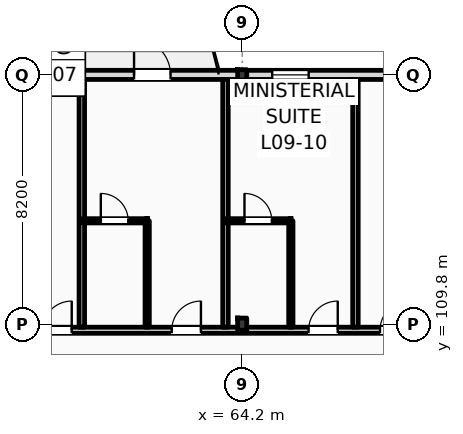
"""IFC4 building model, lengths in metres.
Left out: names, types, materials, properties, quantities, classifications, styles, units other than length and angle.
Written with IfcOpenShell. Run it as: python <this file> out.ifc"""

import sys

from ifc_helpers import new_model, si_unit, direction, frame, frame_2d, origin, origin_2d, place, context, subcontext, project, spatial, rectangle, i_section, extrude, element, fill, save


model = new_model("IFC4")
c1 = context("Model", 3, precision=1e-05, world=origin(), true_north=direction((0.0, 1.0)))
c2 = subcontext(c1, "Body", "Model", "MODEL_VIEW")
j1 = project(units=[si_unit("LENGTHUNIT", "METRE"), si_unit("PLANEANGLEUNIT", "RADIAN")], contexts=[c1])
p1 = place(None, origin())
s1 = spatial("IfcSite", under=j1, at=p1, CompositionType="ELEMENT")
p2 = place(p1, origin())
s2 = spatial("IfcBuilding", under=s1, at=p2, CompositionType="ELEMENT")
p3 = place(p2, frame((0.0, 0.0, 39.0)))
s3 = spatial("IfcBuildingStorey", under=s2, at=p3, CompositionType="ELEMENT", Elevation=39.0)
p4 = place(p3, frame((64.2, 109.8, 0.0), z_axis=(0.0, 0.0, 1.0), x_axis=(1.0, 0.0, 0.0)))
e1 = element("IfcColumn", 1, at=p4, inside=s3, PredefinedType="COLUMN", context=c2, shape_type="SweptSolid", body=[
    extrude(i_section(OverallWidth=0.3, OverallDepth=0.4, WebThickness=0.013, FlangeThickness=0.024, FilletRadius=0.027, at=origin_2d()), origin(), (0.0, 0.0, 1.0), 3.6),
])
p5 = place(p3, frame((64.2, 118.0, 0.0), z_axis=(0.0, 0.0, 1.0), x_axis=(1.0, 0.0, 0.0)))
e2 = element("IfcColumn", 2, at=p5, inside=s3, PredefinedType="COLUMN", context=c2, shape_type="SweptSolid", body=[
    extrude(i_section(OverallWidth=0.3, OverallDepth=0.34, WebThickness=0.012, FlangeThickness=0.021, FilletRadius=0.027, at=origin_2d()), origin(), (0.0, 0.0, 1.0), 3.6),
])
p6 = place(p3, frame((22.5, 118.0, 0.0), z_axis=(0.0, 0.0, 1.0), x_axis=(1.0, 0.0, 0.0)))
e3 = element("IfcWall", 3, at=p6, inside=s3, PredefinedType="STANDARD", context=c2, shape_type="SweptSolid", body=[
    extrude(rectangle(XDim=72.9, YDim=0.3, at=frame_2d((36.45, 0.0))), origin(), (0.0, 0.0, 1.0), 2.92),
])
p7 = place(p6, frame((3.6, 0.0, 0.9)))
e4 = element("IfcOpeningElement", 4, at=p7, cuts=e3, PredefinedType="OPENING", context=c2, shape_type="SweptSolid", body=[
    extrude(rectangle(XDim=1.1, YDim=1.6, at=frame_2d((0.55, 0.8))), frame((0.0, 0.16, 0.0), z_axis=(0.0, -1.0, 0.0), x_axis=(1.0, 0.0, 0.0)), (0.0, 0.0, 1.0), 0.32),
])
p8 = place(p6, frame((6.688, 0.0, 0.0)))
e5 = element("IfcOpeningElement", 5, at=p8, cuts=e3, PredefinedType="OPENING", context=c2, shape_type="SweptSolid", body=[
    extrude(rectangle(XDim=1.2, YDim=2.25, at=frame_2d((0.6, 1.125))), frame((0.0, 0.16, 0.0), z_axis=(0.0, -1.0, 0.0), x_axis=(1.0, 0.0, 0.0)), (0.0, 0.0, 1.0), 0.32),
])
p9 = place(p6, frame((11.388, 0.0, 0.9)))
e6 = element("IfcOpeningElement", 6, at=p9, cuts=e3, PredefinedType="OPENING", context=c2, shape_type="SweptSolid", body=[
    extrude(rectangle(XDim=1.6, YDim=1.75, at=frame_2d((0.8, 0.875))), frame((0.0, 0.16, 0.0), z_axis=(0.0, -1.0, 0.0), x_axis=(1.0, 0.0, 0.0)), (0.0, 0.0, 1.0), 0.32),
])
p10 = place(p6, frame((15.413, 0.0, 0.9)))
e7 = element("IfcOpeningElement", 7, at=p10, cuts=e3, PredefinedType="OPENING", context=c2, shape_type="SweptSolid", body=[
    extrude(rectangle(XDim=1.75, YDim=1.84, at=frame_2d((0.875, 0.92))), frame((0.0, 0.16, 0.0), z_axis=(0.0, -1.0, 0.0), x_axis=(1.0, 0.0, 0.0)), (0.0, 0.0, 1.0), 0.32),
])
p11 = place(p6, frame((21.245, 0.0, 0.0)))
e8 = element("IfcOpeningElement", 8, at=p11, cuts=e3, PredefinedType="OPENING", context=c2, shape_type="SweptSolid", body=[
    extrude(rectangle(XDim=1.2, YDim=2.25, at=frame_2d((0.6, 1.125))), frame((0.0, 0.16, 0.0), z_axis=(0.0, -1.0, 0.0), x_axis=(1.0, 0.0, 0.0)), (0.0, 0.0, 1.0), 0.32),
])
p12 = place(p6, frame((23.705, 0.0, 0.0)))
e9 = element("IfcOpeningElement", 9, at=p12, cuts=e3, PredefinedType="OPENING", context=c2, shape_type="SweptSolid", body=[
    extrude(rectangle(XDim=1.2, YDim=2.25, at=frame_2d((0.6, 1.125))), frame((0.0, 0.16, 0.0), z_axis=(0.0, -1.0, 0.0), x_axis=(1.0, 0.0, 0.0)), (0.0, 0.0, 1.0), 0.32),
])
p13 = place(p6, frame((28.488, 0.0, 0.9)))
e10 = element("IfcOpeningElement", 10, at=p13, cuts=e3, PredefinedType="OPENING", context=c2, shape_type="SweptSolid", body=[
    extrude(rectangle(XDim=2.6, YDim=1.84, at=frame_2d((1.3, 0.92))), frame((0.0, 0.16, 0.0), z_axis=(0.0, -1.0, 0.0), x_axis=(1.0, 0.0, 0.0)), (0.0, 0.0, 1.0), 0.32),
])
p14 = place(p6, frame((34.76, 0.0, 0.9)))
e11 = element("IfcOpeningElement", 11, at=p14, cuts=e3, PredefinedType="OPENING", context=c2, shape_type="SweptSolid", body=[
    extrude(rectangle(XDim=1.1, YDim=1.84, at=frame_2d((0.55, 0.92))), frame((0.0, 0.16, 0.0), z_axis=(0.0, -1.0, 0.0), x_axis=(1.0, 0.0, 0.0)), (0.0, 0.0, 1.0), 0.32),
])
p15 = place(p6, frame((38.143, 0.0, 0.0)))
e12 = element("IfcOpeningElement", 12, at=p15, cuts=e3, PredefinedType="OPENING", context=c2, shape_type="SweptSolid", body=[
    extrude(rectangle(XDim=1.2, YDim=2.25, at=frame_2d((0.6, 1.125))), frame((0.0, 0.16, 0.0), z_axis=(0.0, -1.0, 0.0), x_axis=(1.0, 0.0, 0.0)), (0.0, 0.0, 1.0), 0.32),
])
p16 = place(p6, frame((42.687, 0.0, 0.9)))
e13 = element("IfcOpeningElement", 13, at=p16, cuts=e3, PredefinedType="OPENING", context=c2, shape_type="SweptSolid", body=[
    extrude(rectangle(XDim=1.2, YDim=1.8, at=frame_2d((0.6, 0.9))), frame((0.0, 0.16, 0.0), z_axis=(0.0, -1.0, 0.0), x_axis=(1.0, 0.0, 0.0)), (0.0, 0.0, 1.0), 0.32),
])
p17 = place(p6, frame((47.112, 0.0, 0.9)))
e14 = element("IfcOpeningElement", 14, at=p17, cuts=e3, PredefinedType="OPENING", context=c2, shape_type="SweptSolid", body=[
    extrude(rectangle(XDim=1.35, YDim=1.84, at=frame_2d((0.675, 0.92))), frame((0.0, 0.16, 0.0), z_axis=(0.0, -1.0, 0.0), x_axis=(1.0, 0.0, 0.0)), (0.0, 0.0, 1.0), 0.32),
])
p18 = place(p6, frame((52.482, 0.0, 0.0)))
e15 = element("IfcOpeningElement", 15, at=p18, cuts=e3, PredefinedType="OPENING", context=c2, shape_type="SweptSolid", body=[
    extrude(rectangle(XDim=1.2, YDim=2.25, at=frame_2d((0.6, 1.125))), frame((0.0, 0.16, 0.0), z_axis=(0.0, -1.0, 0.0), x_axis=(1.0, 0.0, 0.0)), (0.0, 0.0, 1.0), 0.32),
])
p19 = place(p6, frame((54.942, 0.0, 0.0)))
e16 = element("IfcOpeningElement", 16, at=p19, cuts=e3, PredefinedType="OPENING", context=c2, shape_type="SweptSolid", body=[
    extrude(rectangle(XDim=1.2, YDim=2.25, at=frame_2d((0.6, 1.125))), frame((0.0, 0.16, 0.0), z_axis=(0.0, -1.0, 0.0), x_axis=(1.0, 0.0, 0.0)), (0.0, 0.0, 1.0), 0.32),
])
p20 = place(p6, frame((60.387, 0.0, 0.9)))
e17 = element("IfcOpeningElement", 17, at=p20, cuts=e3, PredefinedType="OPENING", context=c2, shape_type="SweptSolid", body=[
    extrude(rectangle(XDim=1.8, YDim=1.84, at=frame_2d((0.9, 0.92))), frame((0.0, 0.16, 0.0), z_axis=(0.0, -1.0, 0.0), x_axis=(1.0, 0.0, 0.0)), (0.0, 0.0, 1.0), 0.32),
])
p21 = place(p6, frame((66.013, 0.0, 0.9)))
e18 = element("IfcOpeningElement", 18, at=p21, cuts=e3, PredefinedType="OPENING", context=c2, shape_type="SweptSolid", body=[
    extrude(rectangle(XDim=1.35, YDim=1.84, at=frame_2d((0.675, 0.92))), frame((0.0, 0.16, 0.0), z_axis=(0.0, -1.0, 0.0), x_axis=(1.0, 0.0, 0.0)), (0.0, 0.0, 1.0), 0.32),
])
p22 = place(p6, frame((69.275, 0.0, 0.9)))
e19 = element("IfcOpeningElement", 19, at=p22, cuts=e3, PredefinedType="OPENING", context=c2, shape_type="SweptSolid", body=[
    extrude(rectangle(XDim=2.1, YDim=1.84, at=frame_2d((1.05, 0.92))), frame((0.0, 0.16, 0.0), z_axis=(0.0, -1.0, 0.0), x_axis=(1.0, 0.0, 0.0)), (0.0, 0.0, 1.0), 0.32),
])
p23 = place(p3, frame((10.65, 109.6, 0.0), z_axis=(0.0, 0.0, 1.0), x_axis=(1.0, 0.0, 0.0)))
e20 = element("IfcWall", 20, at=p23, inside=s3, PredefinedType="PARTITIONING", context=c2, shape_type="SweptSolid", body=[
    extrude(rectangle(XDim=84.61, YDim=0.2, at=frame_2d((42.305, 0.0))), origin(), (0.0, 0.0, 1.0), 2.82),
])
p24 = place(p23, frame((15.49, 0.0, 0.0)))
e21 = element("IfcOpeningElement", 21, at=p24, cuts=e20, PredefinedType="OPENING", context=c2, shape_type="SweptSolid", body=[
    extrude(rectangle(XDim=1.02, YDim=2.2, at=frame_2d((0.51, 1.1))), frame((0.0, 0.11, 0.0), z_axis=(0.0, -1.0, 0.0), x_axis=(1.0, 0.0, 0.0)), (0.0, 0.0, 1.0), 0.22),
])
p25 = place(p23, frame((19.703, 0.0, 0.0)))
e22 = element("IfcOpeningElement", 22, at=p25, cuts=e20, PredefinedType="OPENING", context=c2, shape_type="SweptSolid", body=[
    extrude(rectangle(XDim=1.02, YDim=2.2, at=frame_2d((0.51, 1.1))), frame((0.0, 0.11, 0.0), z_axis=(0.0, -1.0, 0.0), x_axis=(1.0, 0.0, 0.0)), (0.0, 0.0, 1.0), 0.22),
])
p26 = place(p23, frame((24.203, 0.0, 0.0)))
e23 = element("IfcOpeningElement", 23, at=p26, cuts=e20, PredefinedType="OPENING", context=c2, shape_type="SweptSolid", body=[
    extrude(rectangle(XDim=1.02, YDim=2.2, at=frame_2d((0.51, 1.1))), frame((0.0, 0.11, 0.0), z_axis=(0.0, -1.0, 0.0), x_axis=(1.0, 0.0, 0.0)), (0.0, 0.0, 1.0), 0.22),
])
p27 = place(p23, frame((26.552, 0.0, 0.0)))
e24 = element("IfcOpeningElement", 24, at=p27, cuts=e20, PredefinedType="OPENING", context=c2, shape_type="SweptSolid", body=[
    extrude(rectangle(XDim=1.02, YDim=2.2, at=frame_2d((0.51, 1.1))), frame((0.0, 0.11, 0.0), z_axis=(0.0, -1.0, 0.0), x_axis=(1.0, 0.0, 0.0)), (0.0, 0.0, 1.0), 0.22),
])
p28 = place(p23, frame((33.233, 0.0, 0.0)))
e25 = element("IfcOpeningElement", 25, at=p28, cuts=e20, PredefinedType="OPENING", context=c2, shape_type="SweptSolid", body=[
    extrude(rectangle(XDim=0.96, YDim=2.2, at=frame_2d((0.48, 1.1))), frame((0.0, 0.11, 0.0), z_axis=(0.0, -1.0, 0.0), x_axis=(1.0, 0.0, 0.0)), (0.0, 0.0, 1.0), 0.22),
])
p29 = place(p23, frame((35.583, 0.0, 0.0)))
e26 = element("IfcOpeningElement", 26, at=p29, cuts=e20, PredefinedType="OPENING", context=c2, shape_type="SweptSolid", body=[
    extrude(rectangle(XDim=0.96, YDim=2.2, at=frame_2d((0.48, 1.1))), frame((0.0, 0.11, 0.0), z_axis=(0.0, -1.0, 0.0), x_axis=(1.0, 0.0, 0.0)), (0.0, 0.0, 1.0), 0.22),
])
p30 = place(p23, frame((42.233, 0.0, 0.0)))
e27 = element("IfcOpeningElement", 27, at=p30, cuts=e20, PredefinedType="OPENING", context=c2, shape_type="SweptSolid", body=[
    extrude(rectangle(XDim=0.96, YDim=2.2, at=frame_2d((0.48, 1.1))), frame((0.0, 0.11, 0.0), z_axis=(0.0, -1.0, 0.0), x_axis=(1.0, 0.0, 0.0)), (0.0, 0.0, 1.0), 0.22),
])
p31 = place(p23, frame((46.983, 0.0, 0.0)))
e28 = element("IfcOpeningElement", 28, at=p31, cuts=e20, PredefinedType="OPENING", context=c2, shape_type="SweptSolid", body=[
    extrude(rectangle(XDim=0.96, YDim=2.2, at=frame_2d((0.48, 1.1))), frame((0.0, 0.11, 0.0), z_axis=(0.0, -1.0, 0.0), x_axis=(1.0, 0.0, 0.0)), (0.0, 0.0, 1.0), 0.22),
])
p32 = place(p23, frame((51.233, 0.0, 0.0)))
e29 = element("IfcOpeningElement", 29, at=p32, cuts=e20, PredefinedType="OPENING", context=c2, shape_type="SweptSolid", body=[
    extrude(rectangle(XDim=0.96, YDim=2.2, at=frame_2d((0.48, 1.1))), frame((0.0, 0.11, 0.0), z_axis=(0.0, -1.0, 0.0), x_axis=(1.0, 0.0, 0.0)), (0.0, 0.0, 1.0), 0.22),
])
p33 = place(p23, frame((55.733, 0.0, 0.0)))
e30 = element("IfcOpeningElement", 30, at=p33, cuts=e20, PredefinedType="OPENING", context=c2, shape_type="SweptSolid", body=[
    extrude(rectangle(XDim=0.96, YDim=2.2, at=frame_2d((0.48, 1.1))), frame((0.0, 0.11, 0.0), z_axis=(0.0, -1.0, 0.0), x_axis=(1.0, 0.0, 0.0)), (0.0, 0.0, 1.0), 0.22),
])
p34 = place(p23, frame((58.083, 0.0, 0.0)))
e31 = element("IfcOpeningElement", 31, at=p34, cuts=e20, PredefinedType="OPENING", context=c2, shape_type="SweptSolid", body=[
    extrude(rectangle(XDim=0.96, YDim=2.2, at=frame_2d((0.48, 1.1))), frame((0.0, 0.11, 0.0), z_axis=(0.0, -1.0, 0.0), x_axis=(1.0, 0.0, 0.0)), (0.0, 0.0, 1.0), 0.22),
])
p35 = place(p23, frame((64.732, 0.0, 0.0)))
e32 = element("IfcOpeningElement", 32, at=p35, cuts=e20, PredefinedType="OPENING", context=c2, shape_type="SweptSolid", body=[
    extrude(rectangle(XDim=0.96, YDim=2.2, at=frame_2d((0.48, 1.1))), frame((0.0, 0.11, 0.0), z_axis=(0.0, -1.0, 0.0), x_axis=(1.0, 0.0, 0.0)), (0.0, 0.0, 1.0), 0.22),
])
p36 = place(p23, frame((66.832, 0.0, 0.0)))
e33 = element("IfcOpeningElement", 33, at=p36, cuts=e20, PredefinedType="OPENING", context=c2, shape_type="SweptSolid", body=[
    extrude(rectangle(XDim=0.96, YDim=2.2, at=frame_2d((0.48, 1.1))), frame((0.0, 0.11, 0.0), z_axis=(0.0, -1.0, 0.0), x_axis=(1.0, 0.0, 0.0)), (0.0, 0.0, 1.0), 0.22),
])
p37 = place(p23, frame((73.732, 0.0, 0.0)))
e34 = element("IfcOpeningElement", 34, at=p37, cuts=e20, PredefinedType="OPENING", context=c2, shape_type="SweptSolid", body=[
    extrude(rectangle(XDim=0.96, YDim=2.2, at=frame_2d((0.48, 1.1))), frame((0.0, 0.11, 0.0), z_axis=(0.0, -1.0, 0.0), x_axis=(1.0, 0.0, 0.0)), (0.0, 0.0, 1.0), 0.22),
])
p38 = place(p23, frame((78.233, 0.0, 0.0)))
e35 = element("IfcOpeningElement", 35, at=p38, cuts=e20, PredefinedType="OPENING", context=c2, shape_type="SweptSolid", body=[
    extrude(rectangle(XDim=0.96, YDim=2.2, at=frame_2d((0.48, 1.1))), frame((0.0, 0.11, 0.0), z_axis=(0.0, -1.0, 0.0), x_axis=(1.0, 0.0, 0.0)), (0.0, 0.0, 1.0), 0.22),
])
p39 = place(p23, frame((80.62, 0.0, 0.0)))
e36 = element("IfcOpeningElement", 36, at=p39, cuts=e20, PredefinedType="OPENING", context=c2, shape_type="SweptSolid", body=[
    extrude(rectangle(XDim=0.96, YDim=2.2, at=frame_2d((0.48, 1.1))), frame((0.0, 0.11, 0.0), z_axis=(0.0, -1.0, 0.0), x_axis=(1.0, 0.0, 0.0)), (0.0, 0.0, 1.0), 0.22),
])
p40 = place(p23, frame((2.716, 0.0, 0.0)))
e37 = element("IfcOpeningElement", 37, at=p40, cuts=e20, PredefinedType="OPENING", context=c2, shape_type="SweptSolid", body=[
    extrude(rectangle(XDim=1.35, YDim=2.25, at=frame_2d((0.675, 1.125))), frame((0.0, 0.11, 0.0), z_axis=(0.0, -1.0, 0.0), x_axis=(1.0, 0.0, 0.0)), (0.0, 0.0, 1.0), 0.22),
])
p41 = place(p23, frame((6.65, 0.0, 0.0)))
e38 = element("IfcOpeningElement", 38, at=p41, cuts=e20, PredefinedType="OPENING", context=c2, shape_type="SweptSolid", body=[
    extrude(rectangle(XDim=1.35, YDim=2.25, at=frame_2d((0.675, 1.125))), frame((0.0, 0.11, 0.0), z_axis=(0.0, -1.0, 0.0), x_axis=(1.0, 0.0, 0.0)), (0.0, 0.0, 1.0), 0.22),
])
p42 = place(p23, frame((10.583, 0.0, 0.0)))
e39 = element("IfcOpeningElement", 39, at=p42, cuts=e20, PredefinedType="OPENING", context=c2, shape_type="SweptSolid", body=[
    extrude(rectangle(XDim=1.35, YDim=2.25, at=frame_2d((0.675, 1.125))), frame((0.0, 0.11, 0.0), z_axis=(0.0, -1.0, 0.0), x_axis=(1.0, 0.0, 0.0)), (0.0, 0.0, 1.0), 0.22),
])
p43 = place(p3, frame((58.925, 109.7, 0.0), z_axis=(0.0, 0.0, 1.0), x_axis=(0.0, 1.0, 0.0)))
e40 = element("IfcWall", 40, at=p43, inside=s3, PredefinedType="PARTITIONING", context=c2, shape_type="SweptSolid", body=[
    extrude(rectangle(XDim=8.15, YDim=0.18, at=frame_2d((4.075, 0.0))), origin(), (0.0, 0.0, 1.0), 3.07),
])
p44 = place(p3, frame((63.65, 109.7, 0.0), z_axis=(0.0, 0.0, 1.0), x_axis=(0.0, 1.0, 0.0)))
e41 = element("IfcWall", 41, at=p44, inside=s3, PredefinedType="PARTITIONING", context=c2, shape_type="SweptSolid", body=[
    extrude(rectangle(XDim=8.15, YDim=0.18, at=frame_2d((4.075, 0.0))), origin(), (0.0, 0.0, 1.0), 3.38),
])
p45 = place(p3, frame((61.075, 109.7, 0.0), z_axis=(0.0, 0.0, 1.0), x_axis=(0.0, 1.0, 0.0)))
e42 = element("IfcWall", 42, at=p45, inside=s3, PredefinedType="PARTITIONING", context=c2, shape_type="SweptSolid", body=[
    extrude(rectangle(XDim=3.5, YDim=0.14, at=frame_2d((1.75, 0.0))), origin(), (0.0, 0.0, 1.0), 3.38),
])
p46 = place(p3, frame((58.925, 113.2, 0.0), z_axis=(0.0, 0.0, 1.0), x_axis=(1.0, 0.0, 0.0)))
e43 = element("IfcWall", 43, at=p46, inside=s3, PredefinedType="PARTITIONING", context=c2, shape_type="SweptSolid", body=[
    extrude(rectangle(XDim=2.15, YDim=0.14, at=frame_2d((1.075, 0.0))), origin(), (0.0, 0.0, 1.0), 3.38),
])
p47 = place(p46, frame((0.625, 0.0, 0.0)))
e44 = element("IfcOpeningElement", 44, at=p47, cuts=e43, PredefinedType="OPENING", context=c2, shape_type="SweptSolid", body=[
    extrude(rectangle(XDim=0.9, YDim=2.1, at=frame_2d((0.45, 1.05))), frame((0.0, 0.08, 0.0), z_axis=(0.0, -1.0, 0.0), x_axis=(1.0, 0.0, 0.0)), (0.0, 0.0, 1.0), 0.16),
])
p48 = place(p3, frame((67.925, 109.7, 0.0), z_axis=(0.0, 0.0, 1.0), x_axis=(0.0, 1.0, 0.0)))
e45 = element("IfcWall", 45, at=p48, inside=s3, PredefinedType="PARTITIONING", context=c2, shape_type="SweptSolid", body=[
    extrude(rectangle(XDim=8.15, YDim=0.18, at=frame_2d((4.075, 0.0))), origin(), (0.0, 0.0, 1.0), 3.38),
])
p49 = place(p3, frame((65.8, 109.7, 0.0), z_axis=(0.0, 0.0, 1.0), x_axis=(0.0, 1.0, 0.0)))
e46 = element("IfcWall", 46, at=p49, inside=s3, PredefinedType="PARTITIONING", context=c2, shape_type="SweptSolid", body=[
    extrude(rectangle(XDim=3.5, YDim=0.14, at=frame_2d((1.75, 0.0))), origin(), (0.0, 0.0, 1.0), 3.38),
])
p50 = place(p3, frame((63.65, 113.2, 0.0), z_axis=(0.0, 0.0, 1.0), x_axis=(1.0, 0.0, 0.0)))
e47 = element("IfcWall", 47, at=p50, inside=s3, PredefinedType="PARTITIONING", context=c2, shape_type="SweptSolid", body=[
    extrude(rectangle(XDim=2.15, YDim=0.14, at=frame_2d((1.075, 0.0))), origin(), (0.0, 0.0, 1.0), 3.38),
])
p51 = place(p50, frame((0.625, 0.0, 0.0)))
e48 = element("IfcOpeningElement", 48, at=p51, cuts=e47, PredefinedType="OPENING", context=c2, shape_type="SweptSolid", body=[
    extrude(rectangle(XDim=0.9, YDim=2.1, at=frame_2d((0.45, 1.05))), frame((0.0, 0.08, 0.0), z_axis=(0.0, -1.0, 0.0), x_axis=(1.0, 0.0, 0.0)), (0.0, 0.0, 1.0), 0.16),
])
p52 = place(p14, origin())
e49 = element("IfcWindow", 49, at=p52, inside=s3, PartitioningType="DOUBLE_PANEL_VERTICAL", PredefinedType="WINDOW", context=c2, shape_type="SweptSolid", body=[
    extrude(rectangle(XDim=1.1, YDim=1.84, at=frame_2d((0.55, 0.92))), frame((0.0, 0.03, 0.0), z_axis=(0.0, -1.0, 0.0), x_axis=(1.0, 0.0, 0.0)), (0.0, 0.0, 1.0), 0.06),
])
fill(e11, e49)
p53 = place(p15, origin())
e50 = element("IfcDoor", 50, at=p53, inside=s3, OperationType="SINGLE_SWING_LEFT", PredefinedType="DOOR", context=c2, shape_type="SweptSolid", body=[
    extrude(rectangle(XDim=1.2, YDim=2.25, at=frame_2d((0.6, 1.125))), frame((0.0, 0.025, 0.0), z_axis=(0.0, -1.0, 0.0), x_axis=(1.0, 0.0, 0.0)), (0.0, 0.0, 1.0), 0.05),
])
fill(e12, e50)
p54 = place(p16, origin())
e51 = element("IfcWindow", 51, at=p54, inside=s3, PartitioningType="DOUBLE_PANEL_VERTICAL", PredefinedType="WINDOW", context=c2, shape_type="SweptSolid", body=[
    extrude(rectangle(XDim=1.2, YDim=1.8, at=frame_2d((0.6, 0.9))), frame((0.0, 0.03, 0.0), z_axis=(0.0, -1.0, 0.0), x_axis=(1.0, 0.0, 0.0)), (0.0, 0.0, 1.0), 0.06),
])
fill(e13, e51)
p55 = place(p31, origin())
e52 = element("IfcDoor", 52, at=p55, inside=s3, OperationType="SINGLE_SWING_RIGHT", PredefinedType="DOOR", context=c2, shape_type="SweptSolid", body=[
    extrude(rectangle(XDim=0.96, YDim=2.2, at=frame_2d((0.48, 1.1))), frame((0.0, 0.025, 0.0), z_axis=(0.0, -1.0, 0.0), x_axis=(1.0, 0.0, 0.0)), (0.0, 0.0, 1.0), 0.05),
])
fill(e28, e52)
p56 = place(p32, origin())
e53 = element("IfcDoor", 53, at=p56, inside=s3, OperationType="SINGLE_SWING_RIGHT", PredefinedType="DOOR", context=c2, shape_type="SweptSolid", body=[
    extrude(rectangle(XDim=0.96, YDim=2.2, at=frame_2d((0.48, 1.1))), frame((0.0, 0.025, 0.0), z_axis=(0.0, -1.0, 0.0), x_axis=(1.0, 0.0, 0.0)), (0.0, 0.0, 1.0), 0.05),
])
fill(e29, e53)
p57 = place(p47, origin())
e54 = element("IfcDoor", 54, at=p57, inside=s3, OperationType="SINGLE_SWING_LEFT", PredefinedType="DOOR", context=c2, shape_type="SweptSolid", body=[
    extrude(rectangle(XDim=0.9, YDim=2.1, at=frame_2d((0.45, 1.05))), frame((0.0, 0.025, 0.0), z_axis=(0.0, -1.0, 0.0), x_axis=(1.0, 0.0, 0.0)), (0.0, 0.0, 1.0), 0.05),
])
fill(e44, e54)
p58 = place(p33, origin())
e55 = element("IfcDoor", 55, at=p58, inside=s3, OperationType="SINGLE_SWING_RIGHT", PredefinedType="DOOR", context=c2, shape_type="SweptSolid", body=[
    extrude(rectangle(XDim=0.96, YDim=2.2, at=frame_2d((0.48, 1.1))), frame((0.0, 0.025, 0.0), z_axis=(0.0, -1.0, 0.0), x_axis=(1.0, 0.0, 0.0)), (0.0, 0.0, 1.0), 0.05),
])
fill(e30, e55)
p59 = place(p51, origin())
e56 = element("IfcDoor", 56, at=p59, inside=s3, OperationType="SINGLE_SWING_LEFT", PredefinedType="DOOR", context=c2, shape_type="SweptSolid", body=[
    extrude(rectangle(XDim=0.9, YDim=2.1, at=frame_2d((0.45, 1.05))), frame((0.0, 0.025, 0.0), z_axis=(0.0, -1.0, 0.0), x_axis=(1.0, 0.0, 0.0)), (0.0, 0.0, 1.0), 0.05),
])
fill(e48, e56)
p60 = place(p34, origin())
e57 = element("IfcDoor", 57, at=p60, inside=s3, OperationType="SINGLE_SWING_RIGHT", PredefinedType="DOOR", context=c2, shape_type="SweptSolid", body=[
    extrude(rectangle(XDim=0.96, YDim=2.2, at=frame_2d((0.48, 1.1))), frame((0.0, 0.025, 0.0), z_axis=(0.0, -1.0, 0.0), x_axis=(1.0, 0.0, 0.0)), (0.0, 0.0, 1.0), 0.05),
])
fill(e31, e57)
save(model, sys.argv[1])
